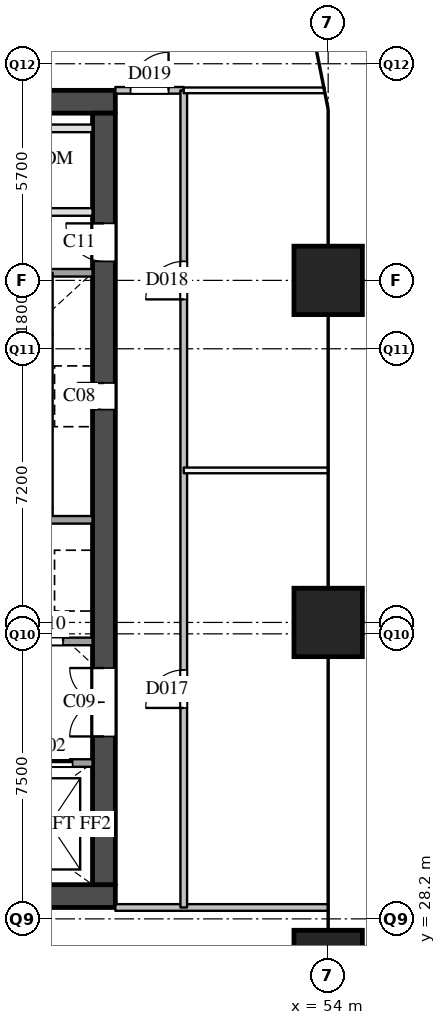
"""IFC4 building model, lengths in metres.
Left out: names, types, materials, properties, quantities, classifications, styles, units other than length and angle.
Written with IfcOpenShell. Run it as: python <this file> out.ifc"""

import sys

from ifc_helpers import new_model, si_unit, direction, frame, frame_2d, origin, origin_2d, place, context, subcontext, project, spatial, rectangle, extrude, element, fill, save


model = new_model("IFC4")
c1 = context("Model", 3, precision=1e-05, world=origin(), true_north=direction((0.0, 1.0)))
c2 = subcontext(c1, "Body", "Model", "MODEL_VIEW")
j1 = project(units=[si_unit("LENGTHUNIT", "METRE"), si_unit("PLANEANGLEUNIT", "RADIAN")], contexts=[c1])
p1 = place(None, origin())
s1 = spatial("IfcSite", under=j1, at=p1, CompositionType="ELEMENT")
p2 = place(p1, origin())
s2 = spatial("IfcBuilding", under=s1, at=p2, CompositionType="ELEMENT")
p3 = place(p2, frame((0.0, 0.0, 21.0)))
s3 = spatial("IfcBuildingStorey", under=s2, at=p3, CompositionType="ELEMENT", Elevation=21.0)
for number, where, z_axis, x_axis in (
    (1, (54.0, 27.0, 0.0), (0.0, 0.0, 1.0), (1.0, 0.0, 0.0)),
    (2, (54.0, 36.0, 0.0), (0.0, 0.0, 1.0), (1.0, 0.0, 0.0)),
    (3, (54.0, 45.0, 0.0), (0.0, 0.0, 1.0), (1.0, 0.0, 0.0)),
):
    element("IfcColumn", number, at=place(p3, frame(where, z_axis=z_axis, x_axis=x_axis)), inside=s3, PredefinedType="COLUMN", context=c2, shape_type="SweptSolid", body=[
        extrude(rectangle(XDim=1.8, YDim=1.8, at=origin_2d()), origin(), (0.0, 0.0, 1.0), 5.0),
    ])
for number, where, z_axis, x_axis in (
    (4, (36.0, 28.8, 0.0), (0.0, 0.0, 1.0), (1.0, 0.0, 0.0)),
    (5, (36.0, 49.7, 0.0), (0.0, 0.0, 1.0), (1.0, 0.0, 0.0)),
):
    element("IfcWall", number, at=place(p3, frame(where, z_axis=z_axis, x_axis=x_axis)), inside=s3, PredefinedType="SHEAR", context=c2, shape_type="SweptSolid", body=[
        extrude(rectangle(XDim=12.4, YDim=0.6, at=frame_2d((6.2, 0.0))), origin(), (0.0, 0.0, 1.0), 4.55),
    ])
p4 = place(p3, frame((48.1, 29.1, 0.0), z_axis=(0.0, 0.0, 1.0), x_axis=(0.0, 1.0, 0.0)))
e6 = element("IfcWall", 6, at=p4, inside=s3, PredefinedType="SHEAR", context=c2, shape_type="SweptSolid", body=[
    extrude(rectangle(XDim=20.3, YDim=0.6, at=frame_2d((10.15, 0.0))), origin(), (0.0, 0.0, 1.0), 4.55),
])
p5 = place(p4, frame((12.5, 0.0, 0.0)))
e7 = element("IfcOpeningElement", 7, at=p5, cuts=e6, PredefinedType="OPENING", context=c2, shape_type="SweptSolid", body=[
    extrude(rectangle(XDim=0.7, YDim=2.1, at=frame_2d((0.35, 1.05))), frame((0.0, 0.31, 0.0), z_axis=(0.0, -1.0, 0.0), x_axis=(1.0, 0.0, 0.0)), (0.0, 0.0, 1.0), 0.62),
])
p6 = place(p4, frame((3.9, 0.0, 0.0)))
e8 = element("IfcOpeningElement", 8, at=p6, cuts=e6, PredefinedType="OPENING", context=c2, shape_type="SweptSolid", body=[
    extrude(rectangle(XDim=1.8, YDim=2.1, at=frame_2d((0.9, 1.05))), frame((0.0, 0.31, 0.0), z_axis=(0.0, -1.0, 0.0), x_axis=(1.0, 0.0, 0.0)), (0.0, 0.0, 1.0), 0.62),
])
p7 = place(p4, frame((16.4, 0.0, 0.0)))
e9 = element("IfcOpeningElement", 9, at=p7, cuts=e6, PredefinedType="OPENING", context=c2, shape_type="SweptSolid", body=[
    extrude(rectangle(XDim=1.0, YDim=2.1, at=frame_2d((0.5, 1.05))), frame((0.0, 0.31, 0.0), z_axis=(0.0, -1.0, 0.0), x_axis=(1.0, 0.0, 0.0)), (0.0, 0.0, 1.0), 0.62),
])
p8 = place(p3, frame((36.6, 32.3, 0.0), z_axis=(0.0, 0.0, 1.0), x_axis=(1.0, 0.0, 0.0)))
e10 = element("IfcWall", 10, at=p8, inside=s3, PredefinedType="SOLIDWALL", context=c2, shape_type="SweptSolid", body=[
    extrude(rectangle(XDim=11.2, YDim=0.2, at=frame_2d((5.6, 0.0))), origin(), (0.0, 0.0, 1.0), 4.55),
])
p9 = place(p8, frame((7.225, 0.0, 0.0)))
e11 = element("IfcOpeningElement", 11, at=p9, cuts=e10, PredefinedType="OPENING", context=c2, shape_type="SweptSolid", body=[
    extrude(rectangle(XDim=1.2, YDim=2.1, at=frame_2d((0.6, 1.05))), frame((0.0, 0.11, 0.0), z_axis=(0.0, -1.0, 0.0), x_axis=(1.0, 0.0, 0.0)), (0.0, 0.0, 1.0), 0.22),
])
p10 = place(p8, frame((9.475, 0.0, 0.0)))
e12 = element("IfcOpeningElement", 12, at=p10, cuts=e10, PredefinedType="OPENING", context=c2, shape_type="SweptSolid", body=[
    extrude(rectangle(XDim=1.2, YDim=2.1, at=frame_2d((0.6, 1.05))), frame((0.0, 0.11, 0.0), z_axis=(0.0, -1.0, 0.0), x_axis=(1.0, 0.0, 0.0)), (0.0, 0.0, 1.0), 0.22),
])
p11 = place(p3, frame((43.3, 35.5, 0.0), z_axis=(0.0, 0.0, 1.0), x_axis=(1.0, 0.0, 0.0)))
e13 = element("IfcWall", 13, at=p11, inside=s3, PredefinedType="SOLIDWALL", context=c2, shape_type="SweptSolid", body=[
    extrude(rectangle(XDim=4.5, YDim=0.2, at=frame_2d((2.25, 0.0))), origin(), (0.0, 0.0, 1.0), 4.55),
])
p12 = place(p11, frame((0.525, 0.0, 0.0)))
e14 = element("IfcOpeningElement", 14, at=p12, cuts=e13, PredefinedType="OPENING", context=c2, shape_type="SweptSolid", body=[
    extrude(rectangle(XDim=1.2, YDim=2.1, at=frame_2d((0.6, 1.05))), frame((0.0, 0.11, 0.0), z_axis=(0.0, -1.0, 0.0), x_axis=(1.0, 0.0, 0.0)), (0.0, 0.0, 1.0), 0.22),
])
p13 = place(p11, frame((3.025, 0.0, 0.0)))
e15 = element("IfcOpeningElement", 15, at=p13, cuts=e13, PredefinedType="OPENING", context=c2, shape_type="SweptSolid", body=[
    extrude(rectangle(XDim=0.7, YDim=2.1, at=frame_2d((0.35, 1.05))), frame((0.0, 0.11, 0.0), z_axis=(0.0, -1.0, 0.0), x_axis=(1.0, 0.0, 0.0)), (0.0, 0.0, 1.0), 0.22),
])
p14 = place(p3, frame((43.3, 38.7, 0.0), z_axis=(0.0, 0.0, 1.0), x_axis=(1.0, 0.0, 0.0)))
e16 = element("IfcWall", 16, at=p14, inside=s3, PredefinedType="SOLIDWALL", context=c2, shape_type="SweptSolid", body=[
    extrude(rectangle(XDim=4.5, YDim=0.2, at=frame_2d((2.25, 0.0))), origin(), (0.0, 0.0, 1.0), 4.55),
])
p15 = place(p3, frame((46.65, 45.2, 0.0), z_axis=(0.0, 0.0, 1.0), x_axis=(1.0, 0.0, 0.0)))
e17 = element("IfcWall", 17, at=p15, inside=s3, PredefinedType="SOLIDWALL", context=c2, shape_type="SweptSolid", body=[
    extrude(rectangle(XDim=1.15, YDim=0.2, at=frame_2d((0.575, 0.0))), origin(), (0.0, 0.0, 1.0), 4.55),
])
p16 = place(p3, frame((36.6, 46.8, 0.0), z_axis=(0.0, 0.0, 1.0), x_axis=(1.0, 0.0, 0.0)))
e18 = element("IfcWall", 18, at=p16, inside=s3, PredefinedType="PARTITIONING", context=c2, shape_type="SweptSolid", body=[
    extrude(rectangle(XDim=11.2, YDim=0.2, at=frame_2d((5.6, 0.0))), origin(), (0.0, 0.0, 1.0), 4.55),
])
p17 = place(p16, frame((5.15, 0.0, 0.0)))
e19 = element("IfcOpeningElement", 19, at=p17, cuts=e18, PredefinedType="OPENING", context=c2, shape_type="SweptSolid", body=[
    extrude(rectangle(XDim=0.9, YDim=2.1, at=frame_2d((0.45, 1.05))), frame((0.0, 0.11, 0.0), z_axis=(0.0, -1.0, 0.0), x_axis=(1.0, 0.0, 0.0)), (0.0, 0.0, 1.0), 0.22),
])
p18 = place(p3, frame((36.6, 49.0, 0.0), z_axis=(0.0, 0.0, 1.0), x_axis=(1.0, 0.0, 0.0)))
e20 = element("IfcWall", 20, at=p18, inside=s3, PredefinedType="PARTITIONING", context=c2, shape_type="SweptSolid", body=[
    extrude(rectangle(XDim=11.2, YDim=0.2, at=frame_2d((5.6, 0.0))), origin(), (0.0, 0.0, 1.0), 4.55),
])
p19 = place(p3, frame((48.4, 28.5, 0.0), z_axis=(0.0, 0.0, 1.0), x_axis=(1.0, 0.0, 0.0)))
e21 = element("IfcWall", 21, at=p19, inside=s3, PredefinedType="PARTITIONING", context=c2, shape_type="SweptSolid", body=[
    extrude(rectangle(XDim=5.6, YDim=0.175, at=frame_2d((2.8, 0.0))), origin(), (0.0, 0.0, 1.0), 3.55),
])
p20 = place(p3, frame((48.4, 50.0, 0.0), z_axis=(0.0, 0.0, 1.0), x_axis=(1.0, 0.0, 0.0)))
e22 = element("IfcWall", 22, at=p20, inside=s3, PredefinedType="PARTITIONING", context=c2, shape_type="SweptSolid", body=[
    extrude(rectangle(XDim=1.8, YDim=0.175, at=frame_2d((0.9, 0.0))), origin(), (0.0, 0.0, 1.0), 4.55),
])
p21 = place(p20, frame((0.4, 0.0, 0.0)))
e23 = element("IfcOpeningElement", 23, at=p21, cuts=e22, PredefinedType="OPENING", context=c2, shape_type="SweptSolid", body=[
    extrude(rectangle(XDim=1.0, YDim=2.1, at=frame_2d((0.5, 1.05))), frame((0.0, 0.097, 0.0), z_axis=(0.0, -1.0, 0.0), x_axis=(1.0, 0.0, 0.0)), (0.0, 0.0, 1.0), 0.195),
])
p22 = place(p3, frame((50.2, 28.5, 0.0), z_axis=(0.0, 0.0, 1.0), x_axis=(0.0, 1.0, 0.0)))
e24 = element("IfcWall", 24, at=p22, inside=s3, PredefinedType="PARTITIONING", context=c2, shape_type="SweptSolid", body=[
    extrude(rectangle(XDim=21.5, YDim=0.175, at=frame_2d((10.75, 0.0))), origin(), (0.0, 0.0, 1.0), 4.55),
])
p23 = place(p22, frame((5.25, 0.0, 0.0)))
e25 = element("IfcOpeningElement", 25, at=p23, cuts=e24, PredefinedType="OPENING", context=c2, shape_type="SweptSolid", body=[
    extrude(rectangle(XDim=1.0, YDim=2.1, at=frame_2d((0.5, 1.05))), frame((0.0, 0.097, 0.0), z_axis=(0.0, -1.0, 0.0), x_axis=(1.0, 0.0, 0.0)), (0.0, 0.0, 1.0), 0.195),
])
p24 = place(p22, frame((16.0, 0.0, 0.0)))
e26 = element("IfcOpeningElement", 26, at=p24, cuts=e24, PredefinedType="OPENING", context=c2, shape_type="SweptSolid", body=[
    extrude(rectangle(XDim=1.0, YDim=2.1, at=frame_2d((0.5, 1.05))), frame((0.0, 0.097, 0.0), z_axis=(0.0, -1.0, 0.0), x_axis=(1.0, 0.0, 0.0)), (0.0, 0.0, 1.0), 0.195),
])
p25 = place(p3, frame((50.2, 40.0, 0.0), z_axis=(0.0, 0.0, 1.0), x_axis=(1.0, 0.0, 0.0)))
e27 = element("IfcWall", 27, at=p25, inside=s3, PredefinedType="PARTITIONING", context=c2, shape_type="SweptSolid", body=[
    extrude(rectangle(XDim=3.8, YDim=0.15, at=frame_2d((1.9, 0.0))), origin(), (0.0, 0.0, 1.0), 3.55),
])
p26 = place(p3, frame((50.2, 50.0, 0.0), z_axis=(0.0, 0.0, 1.0), x_axis=(1.0, 0.0, 0.0)))
e28 = element("IfcWall", 28, at=p26, inside=s3, PredefinedType="PARTITIONING", context=c2, shape_type="SweptSolid", body=[
    extrude(rectangle(XDim=3.7, YDim=0.15, at=frame_2d((1.85, 0.0))), origin(), (0.0, 0.0, 1.0), 3.55),
])
p27 = place(p10, origin())
e29 = element("IfcDoor", 29, at=p27, inside=s3, OperationType="SLIDING_TO_LEFT", PredefinedType="DOOR", context=c2, shape_type="SweptSolid", body=[
    extrude(rectangle(XDim=1.2, YDim=2.1, at=frame_2d((0.6, 1.05))), frame((0.0, 0.025, 0.0), z_axis=(0.0, -1.0, 0.0), x_axis=(1.0, 0.0, 0.0)), (0.0, 0.0, 1.0), 0.05),
])
fill(e12, e29)
p28 = place(p5, origin())
e30 = element("IfcDoor", 30, at=p28, inside=s3, OperationType="SINGLE_SWING_RIGHT", PredefinedType="DOOR", context=c2, shape_type="SweptSolid", body=[
    extrude(rectangle(XDim=0.7, YDim=2.1, at=frame_2d((0.35, 1.05))), frame((0.0, 0.025, 0.0), z_axis=(0.0, -1.0, 0.0), x_axis=(1.0, 0.0, 0.0)), (0.0, 0.0, 1.0), 0.05),
])
fill(e7, e30)
p29 = place(p6, origin())
e31 = element("IfcDoor", 31, at=p29, inside=s3, OperationType="DOUBLE_DOOR_SINGLE_SWING", PredefinedType="DOOR", context=c2, shape_type="SweptSolid", body=[
    extrude(rectangle(XDim=1.8, YDim=2.1, at=frame_2d((0.9, 1.05))), frame((0.0, 0.025, 0.0), z_axis=(0.0, -1.0, 0.0), x_axis=(1.0, 0.0, 0.0)), (0.0, 0.0, 1.0), 0.05),
])
fill(e8, e31)
p30 = place(p13, origin())
e32 = element("IfcDoor", 32, at=p30, inside=s3, OperationType="SINGLE_SWING_RIGHT", PredefinedType="DOOR", context=c2, shape_type="SweptSolid", body=[
    extrude(rectangle(XDim=0.7, YDim=2.1, at=frame_2d((0.35, 1.05))), frame((0.0, 0.025, 0.0), z_axis=(0.0, -1.0, 0.0), x_axis=(1.0, 0.0, 0.0)), (0.0, 0.0, 1.0), 0.05),
])
fill(e15, e32)
p31 = place(p7, origin())
e33 = element("IfcDoor", 33, at=p31, inside=s3, OperationType="SINGLE_SWING_RIGHT", PredefinedType="DOOR", context=c2, shape_type="SweptSolid", body=[
    extrude(rectangle(XDim=1.0, YDim=2.1, at=frame_2d((0.5, 1.05))), frame((0.0, 0.025, 0.0), z_axis=(0.0, -1.0, 0.0), x_axis=(1.0, 0.0, 0.0)), (0.0, 0.0, 1.0), 0.05),
])
fill(e9, e33)
p32 = place(p23, origin())
e34 = element("IfcDoor", 34, at=p32, inside=s3, OperationType="SINGLE_SWING_LEFT", PredefinedType="DOOR", context=c2, shape_type="SweptSolid", body=[
    extrude(rectangle(XDim=1.0, YDim=2.1, at=frame_2d((0.5, 1.05))), frame((0.0, 0.025, 0.0), z_axis=(0.0, -1.0, 0.0), x_axis=(1.0, 0.0, 0.0)), (0.0, 0.0, 1.0), 0.05),
])
fill(e25, e34)
p33 = place(p24, origin())
e35 = element("IfcDoor", 35, at=p33, inside=s3, OperationType="SINGLE_SWING_LEFT", PredefinedType="DOOR", context=c2, shape_type="SweptSolid", body=[
    extrude(rectangle(XDim=1.0, YDim=2.1, at=frame_2d((0.5, 1.05))), frame((0.0, 0.025, 0.0), z_axis=(0.0, -1.0, 0.0), x_axis=(1.0, 0.0, 0.0)), (0.0, 0.0, 1.0), 0.05),
])
fill(e26, e35)
p34 = place(p21, origin())
e36 = element("IfcDoor", 36, at=p34, inside=s3, OperationType="SINGLE_SWING_RIGHT", PredefinedType="DOOR", context=c2, shape_type="SweptSolid", body=[
    extrude(rectangle(XDim=1.0, YDim=2.1, at=frame_2d((0.5, 1.05))), frame((0.0, 0.025, 0.0), z_axis=(0.0, -1.0, 0.0), x_axis=(1.0, 0.0, 0.0)), (0.0, 0.0, 1.0), 0.05),
])
fill(e23, e36)
save(model, sys.argv[1])
